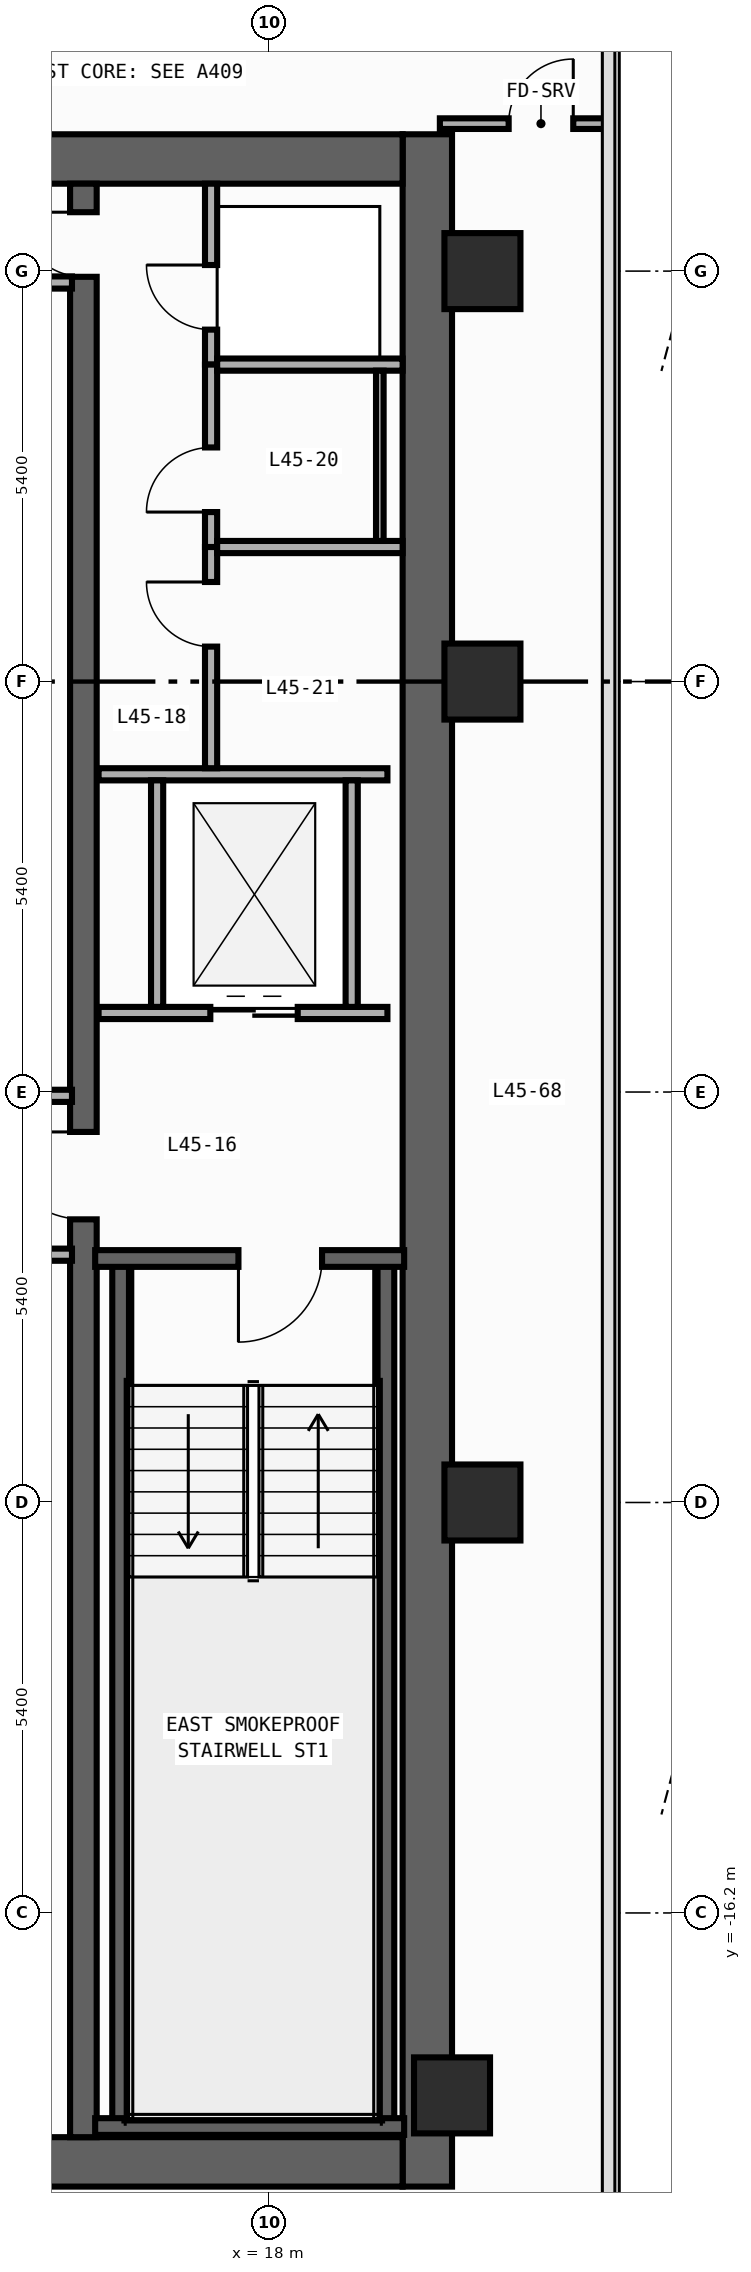
"""IFC4 building model, lengths in metres.
Left out: names, types, materials, properties, quantities, classifications, styles, units other than length and angle.
Written with IfcOpenShell. Run it as: python <this file> out.ifc"""

import sys

from ifc_helpers import new_model, si_unit, direction, frame, frame_2d, origin, origin_2d, place, context, subcontext, project, spatial, rectangle, extrude, element, fill, save


model = new_model("IFC4")
c1 = context("Model", 3, precision=1e-05, world=origin(), true_north=direction((0.0, 1.0)))
c2 = subcontext(c1, "Body", "Model", "MODEL_VIEW")
j1 = project(units=[si_unit("LENGTHUNIT", "METRE"), si_unit("PLANEANGLEUNIT", "RADIAN")], contexts=[c1])
p1 = place(None, origin())
s1 = spatial("IfcSite", under=j1, at=p1, CompositionType="ELEMENT")
p2 = place(p1, origin())
s2 = spatial("IfcBuilding", under=s1, at=p2, CompositionType="ELEMENT")
p3 = place(p2, frame((0.0, 0.0, 195.4)))
s3 = spatial("IfcBuildingStorey", under=s2, at=p3, CompositionType="ELEMENT", Elevation=195.4)
p4 = place(p3, frame((20.075, -19.8, 0.0), z_axis=(0.0, 0.0, 1.0), x_axis=(0.0, 1.0, 0.0)))
e1 = element("IfcWall", 1, at=p4, inside=s3, PredefinedType="SHEAR", context=c2, shape_type="SweptSolid", body=[
    extrude(rectangle(XDim=27.0, YDim=0.65, at=frame_2d((13.5, 0.0))), origin(), (0.0, 0.0, 1.0), 3.54),
])
for number, where, z_axis, x_axis in (
    (2, (12.65, -19.475, 0.0), (0.0, 0.0, 1.0), (1.0, 0.0, 0.0)),
    (3, (12.65, 6.875, 0.0), (0.0, 0.0, 1.0), (1.0, 0.0, 0.0)),
):
    element("IfcWall", number, at=place(p3, frame(where, z_axis=z_axis, x_axis=x_axis)), inside=s3, PredefinedType="SHEAR", context=c2, shape_type="SweptSolid", body=[
        extrude(rectangle(XDim=7.1, YDim=0.65, at=frame_2d((3.55, 0.0))), origin(), (0.0, 0.0, 1.0), 3.54),
    ])
p5 = place(p3, frame((15.55, -19.15, 0.0), z_axis=(0.0, 0.0, 1.0), x_axis=(0.0, 1.0, 0.0)))
e4 = element("IfcWall", 4, at=p5, inside=s3, PredefinedType="SHEAR", context=c2, shape_type="SweptSolid", body=[
    extrude(rectangle(XDim=25.7, YDim=0.35, at=frame_2d((12.85, 0.0))), origin(), (0.0, 0.0, 1.0), 3.54),
])
p6 = place(p5, frame((12.075, 0.0, 0.0)))
e5 = element("IfcOpeningElement", 5, at=p6, cuts=e4, PredefinedType="OPENING", context=c2, shape_type="SweptSolid", body=[
    extrude(rectangle(XDim=1.15, YDim=2.2, at=frame_2d((0.575, 1.1))), frame((0.0, 0.185, 0.0), z_axis=(0.0, -1.0, 0.0), x_axis=(1.0, 0.0, 0.0)), (0.0, 0.0, 1.0), 0.37),
])
p7 = place(p5, frame((24.475, 0.0, 0.0)))
e6 = element("IfcOpeningElement", 6, at=p7, cuts=e4, PredefinedType="OPENING", context=c2, shape_type="SweptSolid", body=[
    extrude(rectangle(XDim=0.85, YDim=2.1, at=frame_2d((0.425, 1.05))), frame((0.0, 0.185, 0.0), z_axis=(0.0, -1.0, 0.0), x_axis=(1.0, 0.0, 0.0)), (0.0, 0.0, 1.0), 0.37),
])
for number, where, z_axis, x_axis in (
    (7, (16.04, -19.01, 0.0), (0.0, 0.0, 1.0), (0.0, 1.0, 0.0)),
    (8, (19.53, -19.01, 0.0), (0.0, 0.0, 1.0), (0.0, 1.0, 0.0)),
):
    element("IfcWall", number, at=place(p3, frame(where, z_axis=z_axis, x_axis=x_axis)), inside=s3, PredefinedType="SHEAR", context=c2, shape_type="SweptSolid", body=[
        extrude(rectangle(XDim=11.42, YDim=0.22, at=frame_2d((5.71, 0.0))), origin(), (0.0, 0.0, 1.0), 3.54),
    ])
p8 = place(p3, frame((15.705, -19.01, 0.0), z_axis=(0.0, 0.0, 1.0), x_axis=(1.0, 0.0, 0.0)))
e9 = element("IfcWall", 9, at=p8, inside=s3, PredefinedType="SHEAR", context=c2, shape_type="SweptSolid", body=[
    extrude(rectangle(XDim=4.065, YDim=0.22, at=frame_2d((2.032, 0.0))), origin(), (0.0, 0.0, 1.0), 3.54),
])
p9 = place(p3, frame((19.77, -7.59, 0.0), z_axis=(0.0, 0.0, 1.0), x_axis=(-1.0, 0.0, 0.0)))
e10 = element("IfcWall", 10, at=p9, inside=s3, PredefinedType="SHEAR", context=c2, shape_type="SweptSolid", body=[
    extrude(rectangle(XDim=4.065, YDim=0.22, at=frame_2d((2.032, 0.0))), origin(), (0.0, 0.0, 1.0), 3.54),
])
p10 = place(p9, frame((1.08, 0.0, 0.0)))
e11 = element("IfcOpeningElement", 11, at=p10, cuts=e10, PredefinedType="OPENING", context=c2, shape_type="SweptSolid", body=[
    extrude(rectangle(XDim=1.1, YDim=2.2, at=frame_2d((0.55, 1.1))), frame((0.0, 0.12, 0.0), z_axis=(0.0, -1.0, 0.0), x_axis=(1.0, 0.0, 0.0)), (0.0, 0.0, 1.0), 0.24),
])
for number, where, z_axis, x_axis in (
    (12, (20.4, -18.6, 0.0), (0.0, 0.0, 1.0), (1.0, 0.0, 0.0)),
    (13, (20.8, -10.8, 0.0), (0.0, 0.0, 1.0), (1.0, 0.0, 0.0)),
    (14, (20.8, 0.0, 0.0), (0.0, 0.0, 1.0), (1.0, 0.0, 0.0)),
    (15, (20.8, 5.4, 0.0), (0.0, 0.0, 1.0), (1.0, 0.0, 0.0)),
):
    element("IfcColumn", number, at=place(p3, frame(where, z_axis=z_axis, x_axis=x_axis)), inside=s3, PredefinedType="COLUMN", context=c2, shape_type="SweptSolid", body=[
        extrude(rectangle(XDim=1.0, YDim=1.0, at=origin_2d()), origin(), (0.0, 0.0, 1.0), 3.8),
    ])
p11 = place(p3, frame((15.75, -4.36, 0.0), z_axis=(0.0, 0.0, 1.0), x_axis=(1.0, 0.0, 0.0)))
e16 = element("IfcWall", 16, at=p11, inside=s3, PredefinedType="STANDARD", context=c2, shape_type="SweptSolid", body=[
    extrude(rectangle(XDim=3.8, YDim=0.16, at=frame_2d((1.9, 0.0))), origin(), (0.0, 0.0, 1.0), 3.54),
])
p12 = place(p11, frame((1.47, 0.0, 0.0)))
e17 = element("IfcOpeningElement", 17, at=p12, cuts=e16, PredefinedType="OPENING", context=c2, shape_type="SweptSolid", body=[
    extrude(rectangle(XDim=1.15, YDim=2.2, at=frame_2d((0.575, 1.1))), frame((0.0, 0.09, 0.0), z_axis=(0.0, -1.0, 0.0), x_axis=(1.0, 0.0, 0.0)), (0.0, 0.0, 1.0), 0.18),
])
p13 = place(p3, frame((15.75, -1.22, 0.0), z_axis=(0.0, 0.0, 1.0), x_axis=(1.0, 0.0, 0.0)))
e18 = element("IfcWall", 18, at=p13, inside=s3, PredefinedType="STANDARD", context=c2, shape_type="SweptSolid", body=[
    extrude(rectangle(XDim=3.8, YDim=0.16, at=frame_2d((1.9, 0.0))), origin(), (0.0, 0.0, 1.0), 3.54),
])
for number, where, z_axis, x_axis in (
    (19, (16.52, -4.28, 0.0), (0.0, 0.0, 1.0), (0.0, 1.0, 0.0)),
    (20, (19.08, -4.28, 0.0), (0.0, 0.0, 1.0), (0.0, 1.0, 0.0)),
):
    element("IfcWall", number, at=place(p3, frame(where, z_axis=z_axis, x_axis=x_axis)), inside=s3, PredefinedType="STANDARD", context=c2, shape_type="SweptSolid", body=[
        extrude(rectangle(XDim=2.98, YDim=0.16, at=frame_2d((1.49, 0.0))), origin(), (0.0, 0.0, 1.0), 3.54),
    ])
for number, where, z_axis, x_axis in (
    (21, (12.8, -5.45, 0.0), (0.0, 0.0, 1.0), (1.0, 0.0, 0.0)),
    (22, (12.8, -7.54, 0.0), (0.0, 0.0, 1.0), (1.0, 0.0, 0.0)),
    (23, (12.8, 5.25, 0.0), (0.0, 0.0, 1.0), (1.0, 0.0, 0.0)),
):
    element("IfcWall", number, at=place(p3, frame(where, z_axis=z_axis, x_axis=x_axis)), inside=s3, PredefinedType="STANDARD", context=c2, shape_type="SweptSolid", body=[
        extrude(rectangle(XDim=2.6, YDim=0.16, at=frame_2d((1.3, 0.0))), origin(), (0.0, 0.0, 1.0), 3.54),
    ])
p14 = place(p3, frame((17.23, 4.17, 0.0), z_axis=(0.0, 0.0, 1.0), x_axis=(0.0, 1.0, 0.0)))
e24 = element("IfcWall", 24, at=p14, inside=s3, PredefinedType="PARTITIONING", context=c2, shape_type="SweptSolid", body=[
    extrude(rectangle(XDim=2.38, YDim=0.16, at=frame_2d((1.19, 0.0))), origin(), (0.0, 0.0, 1.0), 3.54),
])
p15 = place(p14, frame((0.46, 0.0, 0.0)))
e25 = element("IfcOpeningElement", 25, at=p15, cuts=e24, PredefinedType="OPENING", context=c2, shape_type="SweptSolid", body=[
    extrude(rectangle(XDim=0.85, YDim=2.1, at=frame_2d((0.425, 1.05))), frame((0.0, 0.09, 0.0), z_axis=(0.0, -1.0, 0.0), x_axis=(1.0, 0.0, 0.0)), (0.0, 0.0, 1.0), 0.18),
])
p16 = place(p3, frame((17.23, 1.77, 0.0), z_axis=(0.0, 0.0, 1.0), x_axis=(0.0, 1.0, 0.0)))
e26 = element("IfcWall", 26, at=p16, inside=s3, PredefinedType="PARTITIONING", context=c2, shape_type="SweptSolid", body=[
    extrude(rectangle(XDim=2.4, YDim=0.16, at=frame_2d((1.2, 0.0))), origin(), (0.0, 0.0, 1.0), 3.54),
])
p17 = place(p16, frame((0.46, 0.0, 0.0)))
e27 = element("IfcOpeningElement", 27, at=p17, cuts=e26, PredefinedType="OPENING", context=c2, shape_type="SweptSolid", body=[
    extrude(rectangle(XDim=0.85, YDim=2.1, at=frame_2d((0.425, 1.05))), frame((0.0, 0.09, 0.0), z_axis=(0.0, -1.0, 0.0), x_axis=(1.0, 0.0, 0.0)), (0.0, 0.0, 1.0), 0.18),
])
p18 = place(p3, frame((17.23, -1.14, 0.0), z_axis=(0.0, 0.0, 1.0), x_axis=(0.0, 1.0, 0.0)))
e28 = element("IfcWall", 28, at=p18, inside=s3, PredefinedType="PARTITIONING", context=c2, shape_type="SweptSolid", body=[
    extrude(rectangle(XDim=2.91, YDim=0.16, at=frame_2d((1.455, 0.0))), origin(), (0.0, 0.0, 1.0), 3.54),
])
p19 = place(p18, frame((1.6, 0.0, 0.0)))
e29 = element("IfcOpeningElement", 29, at=p19, cuts=e28, PredefinedType="OPENING", context=c2, shape_type="SweptSolid", body=[
    extrude(rectangle(XDim=0.85, YDim=2.1, at=frame_2d((0.425, 1.05))), frame((0.0, 0.09, 0.0), z_axis=(0.0, -1.0, 0.0), x_axis=(1.0, 0.0, 0.0)), (0.0, 0.0, 1.0), 0.18),
])
for number, where, z_axis, x_axis in (
    (30, (17.31, 4.17, 0.0), (0.0, 0.0, 1.0), (1.0, 0.0, 0.0)),
    (31, (17.31, 1.77, 0.0), (0.0, 0.0, 1.0), (1.0, 0.0, 0.0)),
):
    element("IfcWall", number, at=place(p3, frame(where, z_axis=z_axis, x_axis=x_axis)), inside=s3, PredefinedType="PARTITIONING", context=c2, shape_type="SweptSolid", body=[
        extrude(rectangle(XDim=2.44, YDim=0.16, at=frame_2d((1.22, 0.0))), origin(), (0.0, 0.0, 1.0), 3.54),
    ])
p20 = place(p3, frame((20.24, 7.34, 0.0), z_axis=(0.0, 0.0, 1.0), x_axis=(1.0, 0.0, 0.0)))
e32 = element("IfcWall", 32, at=p20, inside=s3, PredefinedType="PARTITIONING", context=c2, shape_type="SweptSolid", body=[
    extrude(rectangle(XDim=2.215, YDim=0.14, at=frame_2d((1.107, 0.0))), origin(), (0.0, 0.0, 1.0), 3.54),
])
p21 = place(p20, frame((0.905, 0.0, 0.0)))
e33 = element("IfcOpeningElement", 33, at=p21, cuts=e32, PredefinedType="OPENING", context=c2, shape_type="SweptSolid", body=[
    extrude(rectangle(XDim=0.85, YDim=2.1, at=frame_2d((0.425, 1.05))), frame((0.0, 0.08, 0.0), z_axis=(0.0, -1.0, 0.0), x_axis=(1.0, 0.0, 0.0)), (0.0, 0.0, 1.0), 0.16),
])
p22 = place(p3, frame((19.45, 4.09, 0.0), z_axis=(0.0, 0.0, 1.0), x_axis=(0.0, -1.0, 0.0)))
e34 = element("IfcWall", 34, at=p22, inside=s3, PredefinedType="PARTITIONING", context=c2, shape_type="SweptSolid", body=[
    extrude(rectangle(XDim=2.24, YDim=0.1, at=frame_2d((1.12, 0.0))), origin(), (0.0, 0.0, 1.0), 3.54),
])
p23 = place(p10, origin())
e35 = element("IfcDoor", 35, at=p23, inside=s3, OperationType="SINGLE_SWING_RIGHT", PredefinedType="DOOR", context=c2, shape_type="SweptSolid", body=[
    extrude(rectangle(XDim=1.1, YDim=2.2, at=frame_2d((0.55, 1.1))), frame((0.0, 0.025, 0.0), z_axis=(0.0, -1.0, 0.0), x_axis=(1.0, 0.0, 0.0)), (0.0, 0.0, 1.0), 0.05),
])
fill(e11, e35)
p24 = place(p6, origin())
e36 = element("IfcDoor", 36, at=p24, inside=s3, OperationType="SINGLE_SWING_RIGHT", PredefinedType="DOOR", context=c2, shape_type="SweptSolid", body=[
    extrude(rectangle(XDim=1.15, YDim=2.2, at=frame_2d((0.575, 1.1))), frame((0.0, 0.025, 0.0), z_axis=(0.0, -1.0, 0.0), x_axis=(1.0, 0.0, 0.0)), (0.0, 0.0, 1.0), 0.05),
])
fill(e5, e36)
p25 = place(p7, origin())
e37 = element("IfcDoor", 37, at=p25, inside=s3, OperationType="SINGLE_SWING_RIGHT", PredefinedType="DOOR", context=c2, shape_type="SweptSolid", body=[
    extrude(rectangle(XDim=0.85, YDim=2.1, at=frame_2d((0.425, 1.05))), frame((0.0, 0.025, 0.0), z_axis=(0.0, -1.0, 0.0), x_axis=(1.0, 0.0, 0.0)), (0.0, 0.0, 1.0), 0.05),
])
fill(e6, e37)
p26 = place(p12, origin())
e38 = element("IfcDoor", 38, at=p26, inside=s3, OperationType="DOUBLE_DOOR_SLIDING", PredefinedType="DOOR", context=c2, shape_type="SweptSolid", body=[
    extrude(rectangle(XDim=1.15, YDim=2.2, at=frame_2d((0.575, 1.1))), frame((0.0, 0.025, 0.0), z_axis=(0.0, -1.0, 0.0), x_axis=(1.0, 0.0, 0.0)), (0.0, 0.0, 1.0), 0.05),
])
fill(e17, e38)
p27 = place(p15, origin())
e39 = element("IfcDoor", 39, at=p27, inside=s3, OperationType="SINGLE_SWING_RIGHT", PredefinedType="DOOR", context=c2, shape_type="SweptSolid", body=[
    extrude(rectangle(XDim=0.85, YDim=2.1, at=frame_2d((0.425, 1.05))), frame((0.0, 0.025, 0.0), z_axis=(0.0, -1.0, 0.0), x_axis=(1.0, 0.0, 0.0)), (0.0, 0.0, 1.0), 0.05),
])
fill(e25, e39)
p28 = place(p17, origin())
e40 = element("IfcDoor", 40, at=p28, inside=s3, OperationType="SINGLE_SWING_LEFT", PredefinedType="DOOR", context=c2, shape_type="SweptSolid", body=[
    extrude(rectangle(XDim=0.85, YDim=2.1, at=frame_2d((0.425, 1.05))), frame((0.0, 0.025, 0.0), z_axis=(0.0, -1.0, 0.0), x_axis=(1.0, 0.0, 0.0)), (0.0, 0.0, 1.0), 0.05),
])
fill(e27, e40)
p29 = place(p19, origin())
e41 = element("IfcDoor", 41, at=p29, inside=s3, OperationType="SINGLE_SWING_RIGHT", PredefinedType="DOOR", context=c2, shape_type="SweptSolid", body=[
    extrude(rectangle(XDim=0.85, YDim=2.1, at=frame_2d((0.425, 1.05))), frame((0.0, 0.025, 0.0), z_axis=(0.0, -1.0, 0.0), x_axis=(1.0, 0.0, 0.0)), (0.0, 0.0, 1.0), 0.05),
])
fill(e29, e41)
p30 = place(p21, origin())
e42 = element("IfcDoor", 42, at=p30, inside=s3, OperationType="SINGLE_SWING_RIGHT", PredefinedType="DOOR", context=c2, shape_type="SweptSolid", body=[
    extrude(rectangle(XDim=0.85, YDim=2.1, at=frame_2d((0.425, 1.05))), frame((0.0, 0.025, 0.0), z_axis=(0.0, -1.0, 0.0), x_axis=(1.0, 0.0, 0.0)), (0.0, 0.0, 1.0), 0.05),
])
fill(e33, e42)
save(model, sys.argv[1])
